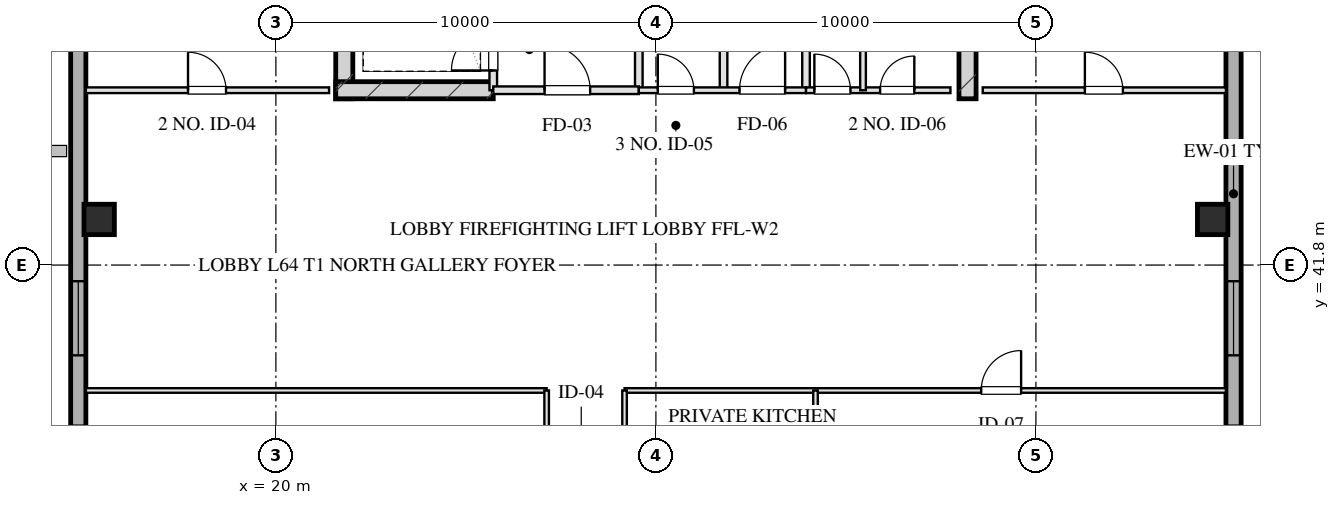
"""IFC4 building model, lengths in metres.
Left out: names, types, materials, properties, quantities, classifications, styles, units other than length and angle.
Written with IfcOpenShell. Run it as: python <this file> out.ifc"""

import sys

from ifc_helpers import new_model, si_unit, direction, frame, frame_2d, origin, origin_2d, place, context, subcontext, project, spatial, rectangle, hollow_rectangle, extrude, element, fill, save


model = new_model("IFC4")
c1 = context("Model", 3, precision=1e-05, world=origin(), true_north=direction((0.0, 1.0)))
c2 = subcontext(c1, "Body", "Model", "MODEL_VIEW")
j1 = project(units=[si_unit("LENGTHUNIT", "METRE"), si_unit("PLANEANGLEUNIT", "RADIAN")], contexts=[c1])
p1 = place(None, origin())
s1 = spatial("IfcSite", under=j1, at=p1, CompositionType="ELEMENT")
p2 = place(p1, origin())
s2 = spatial("IfcBuilding", under=s1, at=p2, CompositionType="ELEMENT")
p3 = place(p2, frame((0.0, 0.0, 237.6)))
s3 = spatial("IfcBuildingStorey", under=s2, at=p3, CompositionType="ELEMENT", Elevation=237.6)
for number, where, z_axis, x_axis in (
    (1, (21.8, 46.175, 0.0), (0.0, 0.0, 1.0), (0.0, 1.0, 0.0)),
    (2, (38.2, 46.175, 0.0), (0.0, 0.0, 1.0), (0.0, 1.0, 0.0)),
):
    element("IfcWall", number, at=place(p3, frame(where, z_axis=z_axis, x_axis=x_axis)), inside=s3, PredefinedType="SHEAR", context=c2, shape_type="SweptSolid", body=[
        extrude(rectangle(XDim=9.33, YDim=0.45, at=frame_2d((4.665, 0.0))), origin(), (0.0, 0.0, 1.0), 3.2),
    ])
p4 = place(p3, frame((21.575, 46.4, 0.0), z_axis=(0.0, 0.0, 1.0), x_axis=(1.0, 0.0, 0.0)))
e3 = element("IfcWall", 3, at=p4, inside=s3, PredefinedType="SHEAR", context=c2, shape_type="SweptSolid", body=[
    extrude(rectangle(XDim=4.145, YDim=0.45, at=frame_2d((2.073, 0.0))), origin(), (0.0, 0.0, 1.0), 3.2),
])
for number, where, z_axis, x_axis in (
    (4, (15.35, 43.0, 0.0), (0.0, 0.0, 1.0), (1.0, 0.0, 0.0)),
    (5, (44.65, 43.0, 0.0), (0.0, 0.0, 1.0), (1.0, 0.0, 0.0)),
):
    element("IfcColumn", number, at=place(p3, frame(where, z_axis=z_axis, x_axis=x_axis)), inside=s3, PredefinedType="COLUMN", context=c2, shape_type="SweptSolid", body=[
        extrude(hollow_rectangle(XDim=0.8, YDim=0.8, WallThickness=0.028, at=origin_2d()), origin(), (0.0, 0.0, 1.0), 3.201),
    ])
p5 = place(p3, frame((14.8, 13.1, 0.0), z_axis=(0.0, 0.0, 1.0), x_axis=(0.0, 1.0, 0.0)))
e6 = element("IfcWall", 6, at=p5, inside=s3, PredefinedType="SOLIDWALL", context=c2, shape_type="SweptSolid", body=[
    extrude(rectangle(XDim=41.8, YDim=0.4, at=frame_2d((20.9, 0.0))), origin(), (0.0, 0.0, 1.0), 2.36),
])
p6 = place(p5, frame((22.525, 0.0, 0.75)))
e7 = element("IfcOpeningElement", 7, at=p6, cuts=e6, PredefinedType="OPENING", context=c2, shape_type="SweptSolid", body=[
    extrude(rectangle(XDim=1.95, YDim=1.21, at=frame_2d((0.975, 0.605))), frame((0.0, 0.21, 0.0), z_axis=(0.0, -1.0, 0.0), x_axis=(1.0, 0.0, 0.0)), (0.0, 0.0, 1.0), 0.42),
])
p7 = place(p5, frame((26.325, 0.0, 0.75)))
e8 = element("IfcOpeningElement", 8, at=p7, cuts=e6, PredefinedType="OPENING", context=c2, shape_type="SweptSolid", body=[
    extrude(rectangle(XDim=1.95, YDim=1.21, at=frame_2d((0.975, 0.605))), frame((0.0, 0.21, 0.0), z_axis=(0.0, -1.0, 0.0), x_axis=(1.0, 0.0, 0.0)), (0.0, 0.0, 1.0), 0.42),
])
p8 = place(p5, frame((17.5, 0.0, 0.0)))
e9 = element("IfcOpeningElement", 9, at=p8, cuts=e6, PredefinedType="OPENING", context=c2, shape_type="SweptSolid", body=[
    extrude(rectangle(XDim=1.1, YDim=2.15, at=frame_2d((0.55, 1.075))), frame((0.0, 0.21, 0.0), z_axis=(0.0, -1.0, 0.0), x_axis=(1.0, 0.0, 0.0)), (0.0, 0.0, 1.0), 0.42),
])
p9 = place(p3, frame((45.2, 54.9, 0.0), z_axis=(0.0, 0.0, 1.0), x_axis=(0.0, -1.0, 0.0)))
e10 = element("IfcWall", 10, at=p9, inside=s3, PredefinedType="SOLIDWALL", context=c2, shape_type="SweptSolid", body=[
    extrude(rectangle(XDim=41.8, YDim=0.4, at=frame_2d((20.9, 0.0))), origin(), (0.0, 0.0, 1.0), 2.36),
])
p10 = place(p9, frame((17.325, 0.0, 0.75)))
e11 = element("IfcOpeningElement", 11, at=p10, cuts=e10, PredefinedType="OPENING", context=c2, shape_type="SweptSolid", body=[
    extrude(rectangle(XDim=1.95, YDim=1.21, at=frame_2d((0.975, 0.605))), frame((0.0, 0.21, 0.0), z_axis=(0.0, -1.0, 0.0), x_axis=(1.0, 0.0, 0.0)), (0.0, 0.0, 1.0), 0.42),
])
p11 = place(p9, frame((13.525, 0.0, 0.75)))
e12 = element("IfcOpeningElement", 12, at=p11, cuts=e10, PredefinedType="OPENING", context=c2, shape_type="SweptSolid", body=[
    extrude(rectangle(XDim=1.95, YDim=1.21, at=frame_2d((0.975, 0.605))), frame((0.0, 0.21, 0.0), z_axis=(0.0, -1.0, 0.0), x_axis=(1.0, 0.0, 0.0)), (0.0, 0.0, 1.0), 0.42),
])
p12 = place(p9, frame((23.2, 0.0, 0.0)))
e13 = element("IfcOpeningElement", 13, at=p12, cuts=e10, PredefinedType="OPENING", context=c2, shape_type="SweptSolid", body=[
    extrude(rectangle(XDim=1.1, YDim=2.15, at=frame_2d((0.55, 1.075))), frame((0.0, 0.21, 0.0), z_axis=(0.0, -1.0, 0.0), x_axis=(1.0, 0.0, 0.0)), (0.0, 0.0, 1.0), 0.42),
])
p13 = place(p3, frame((25.72, 46.4, 0.0), z_axis=(0.0, 0.0, 1.0), x_axis=(0.0, 1.0, 0.0)))
e14 = element("IfcWall", 14, at=p13, inside=s3, PredefinedType="PARTITIONING", context=c2, shape_type="SweptSolid", body=[
    extrude(rectangle(XDim=1.9, YDim=0.2, at=frame_2d((0.95, 0.0))), origin(), (0.0, 0.0, 1.0), 2.925),
])
p14 = place(p13, frame((0.52, 0.0, 0.0)))
e15 = element("IfcOpeningElement", 15, at=p14, cuts=e14, PredefinedType="OPENING", context=c2, shape_type="SweptSolid", body=[
    extrude(rectangle(XDim=1.1, YDim=2.05, at=frame_2d((0.55, 1.025))), frame((0.0, 0.11, 0.0), z_axis=(0.0, -1.0, 0.0), x_axis=(1.0, 0.0, 0.0)), (0.0, 0.0, 1.0), 0.22),
])
p15 = place(p3, frame((29.55, 46.4, 0.0), z_axis=(0.0, 0.0, 1.0), x_axis=(0.0, 1.0, 0.0)))
e16 = element("IfcWall", 16, at=p15, inside=s3, PredefinedType="PARTITIONING", context=c2, shape_type="SweptSolid", body=[
    extrude(rectangle(XDim=8.43, YDim=0.2, at=frame_2d((4.215, 0.0))), origin(), (0.0, 0.0, 1.0), 2.925),
])
p16 = place(p3, frame((25.72, 46.4, 0.0), z_axis=(0.0, 0.0, 1.0), x_axis=(1.0, 0.0, 0.0)))
e17 = element("IfcWall", 17, at=p16, inside=s3, PredefinedType="PARTITIONING", context=c2, shape_type="SweptSolid", body=[
    extrude(rectangle(XDim=3.83, YDim=0.2, at=frame_2d((1.915, 0.0))), origin(), (0.0, 0.0, 1.0), 2.925),
])
p17 = place(p16, frame((1.35, 0.0, 0.0)))
e18 = element("IfcOpeningElement", 18, at=p17, cuts=e17, PredefinedType="OPENING", context=c2, shape_type="SweptSolid", body=[
    extrude(rectangle(XDim=1.2, YDim=2.05, at=frame_2d((0.6, 1.025))), frame((0.0, 0.11, 0.0), z_axis=(0.0, -1.0, 0.0), x_axis=(1.0, 0.0, 0.0)), (0.0, 0.0, 1.0), 0.22),
])
for number, where, z_axis, x_axis in (
    (19, (33.95, 46.4, 0.0), (0.0, 0.0, 1.0), (0.0, 1.0, 0.0)),
    (20, (31.78, 46.4, 0.0), (0.0, 0.0, 1.0), (0.0, 1.0, 0.0)),
):
    element("IfcWall", number, at=place(p3, frame(where, z_axis=z_axis, x_axis=x_axis)), inside=s3, PredefinedType="PARTITIONING", context=c2, shape_type="SweptSolid", body=[
        extrude(rectangle(XDim=8.43, YDim=0.2, at=frame_2d((4.215, 0.0))), origin(), (0.0, 0.0, 1.0), 2.925),
    ])
p18 = place(p3, frame((29.55, 46.4, 0.0), z_axis=(0.0, 0.0, 1.0), x_axis=(1.0, 0.0, 0.0)))
e21 = element("IfcWall", 21, at=p18, inside=s3, PredefinedType="PARTITIONING", context=c2, shape_type="SweptSolid", body=[
    extrude(rectangle(XDim=4.4, YDim=0.15, at=frame_2d((2.2, 0.0))), origin(), (0.0, 0.0, 1.0), 2.925),
])
p19 = place(p18, frame((0.5, 0.0, 0.0)))
e22 = element("IfcOpeningElement", 22, at=p19, cuts=e21, PredefinedType="OPENING", context=c2, shape_type="SweptSolid", body=[
    extrude(rectangle(XDim=0.95, YDim=2.05, at=frame_2d((0.475, 1.025))), frame((0.0, 0.085, 0.0), z_axis=(0.0, -1.0, 0.0), x_axis=(1.0, 0.0, 0.0)), (0.0, 0.0, 1.0), 0.17),
])
p20 = place(p18, frame((2.65, 0.0, 0.0)))
e23 = element("IfcOpeningElement", 23, at=p20, cuts=e21, PredefinedType="OPENING", context=c2, shape_type="SweptSolid", body=[
    extrude(rectangle(XDim=1.2, YDim=2.05, at=frame_2d((0.6, 1.025))), frame((0.0, 0.085, 0.0), z_axis=(0.0, -1.0, 0.0), x_axis=(1.0, 0.0, 0.0)), (0.0, 0.0, 1.0), 0.17),
])
p21 = place(p3, frame((33.95, 46.4, 0.0), z_axis=(0.0, 0.0, 1.0), x_axis=(1.0, 0.0, 0.0)))
e24 = element("IfcWall", 24, at=p21, inside=s3, PredefinedType="PARTITIONING", context=c2, shape_type="SweptSolid", body=[
    extrude(rectangle(XDim=3.8, YDim=0.15, at=frame_2d((1.9, 0.0))), origin(), (0.0, 0.0, 1.0), 2.925),
])
p22 = place(p21, frame((0.22, 0.0, 0.0)))
e25 = element("IfcOpeningElement", 25, at=p22, cuts=e24, PredefinedType="OPENING", context=c2, shape_type="SweptSolid", body=[
    extrude(rectangle(XDim=0.95, YDim=2.05, at=frame_2d((0.475, 1.025))), frame((0.0, 0.085, 0.0), z_axis=(0.0, -1.0, 0.0), x_axis=(1.0, 0.0, 0.0)), (0.0, 0.0, 1.0), 0.17),
])
p23 = place(p21, frame((1.95, 0.0, 0.0)))
e26 = element("IfcOpeningElement", 26, at=p23, cuts=e24, PredefinedType="OPENING", context=c2, shape_type="SweptSolid", body=[
    extrude(rectangle(XDim=0.9, YDim=2.05, at=frame_2d((0.45, 1.025))), frame((0.0, 0.085, 0.0), z_axis=(0.0, -1.0, 0.0), x_axis=(1.0, 0.0, 0.0)), (0.0, 0.0, 1.0), 0.17),
])
p24 = place(p3, frame((35.45, 46.4, 0.0), z_axis=(0.0, 0.0, 1.0), x_axis=(0.0, 1.0, 0.0)))
e27 = element("IfcWall", 27, at=p24, inside=s3, PredefinedType="PARTITIONING", context=c2, shape_type="SweptSolid", body=[
    extrude(rectangle(XDim=8.43, YDim=0.15, at=frame_2d((4.215, 0.0))), origin(), (0.0, 0.0, 1.0), 2.515),
])
p25 = place(p24, frame((2.55, 0.0, 0.0)))
e28 = element("IfcOpeningElement", 28, at=p25, cuts=e27, PredefinedType="OPENING", context=c2, shape_type="SweptSolid", body=[
    extrude(rectangle(XDim=0.95, YDim=2.05, at=frame_2d((0.475, 1.025))), frame((0.0, 0.085, 0.0), z_axis=(0.0, -1.0, 0.0), x_axis=(1.0, 0.0, 0.0)), (0.0, 0.0, 1.0), 0.17),
])
p26 = place(p24, frame((5.6, 0.0, 0.0)))
e29 = element("IfcOpeningElement", 29, at=p26, cuts=e27, PredefinedType="OPENING", context=c2, shape_type="SweptSolid", body=[
    extrude(rectangle(XDim=0.9, YDim=2.05, at=frame_2d((0.45, 1.025))), frame((0.0, 0.085, 0.0), z_axis=(0.0, -1.0, 0.0), x_axis=(1.0, 0.0, 0.0)), (0.0, 0.0, 1.0), 0.17),
])
p27 = place(p3, frame((15.0, 46.4, 0.0), z_axis=(0.0, 0.0, 1.0), x_axis=(1.0, 0.0, 0.0)))
e30 = element("IfcWall", 30, at=p27, inside=s3, PredefinedType="PARTITIONING", context=c2, shape_type="SweptSolid", body=[
    extrude(rectangle(XDim=6.4, YDim=0.15, at=frame_2d((3.2, 0.0))), origin(), (0.0, 0.0, 1.0), 2.925),
])
p28 = place(p27, frame((2.688, 0.0, 0.0)))
e31 = element("IfcOpeningElement", 31, at=p28, cuts=e30, PredefinedType="OPENING", context=c2, shape_type="SweptSolid", body=[
    extrude(rectangle(XDim=1.0, YDim=2.05, at=frame_2d((0.5, 1.025))), frame((0.0, 0.085, 0.0), z_axis=(0.0, -1.0, 0.0), x_axis=(1.0, 0.0, 0.0)), (0.0, 0.0, 1.0), 0.17),
])
p29 = place(p3, frame((38.6, 46.4, 0.0), z_axis=(0.0, 0.0, 1.0), x_axis=(1.0, 0.0, 0.0)))
e32 = element("IfcWall", 32, at=p29, inside=s3, PredefinedType="PARTITIONING", context=c2, shape_type="SweptSolid", body=[
    extrude(rectangle(XDim=6.4, YDim=0.15, at=frame_2d((3.2, 0.0))), origin(), (0.0, 0.0, 1.0), 2.925),
])
p30 = place(p29, frame((2.688, 0.0, 0.0)))
e33 = element("IfcOpeningElement", 33, at=p30, cuts=e32, PredefinedType="OPENING", context=c2, shape_type="SweptSolid", body=[
    extrude(rectangle(XDim=1.0, YDim=2.05, at=frame_2d((0.5, 1.025))), frame((0.0, 0.085, 0.0), z_axis=(0.0, -1.0, 0.0), x_axis=(1.0, 0.0, 0.0)), (0.0, 0.0, 1.0), 0.17),
])
p31 = place(p3, frame((15.0, 38.5, 0.0), z_axis=(0.0, 0.0, 1.0), x_axis=(1.0, 0.0, 0.0)))
e34 = element("IfcWall", 34, at=p31, inside=s3, PredefinedType="PARTITIONING", context=c2, shape_type="SweptSolid", body=[
    extrude(rectangle(XDim=12.125, YDim=0.12, at=frame_2d((6.062, 0.0))), origin(), (0.0, 0.0, 1.0), 2.925),
])
p32 = place(p3, frame((29.175, 38.5, 0.0), z_axis=(0.0, 0.0, 1.0), x_axis=(1.0, 0.0, 0.0)))
e35 = element("IfcWall", 35, at=p32, inside=s3, PredefinedType="PARTITIONING", context=c2, shape_type="SweptSolid", body=[
    extrude(rectangle(XDim=15.825, YDim=0.12, at=frame_2d((7.913, 0.0))), origin(), (0.0, 0.0, 1.0), 2.925),
])
p33 = place(p32, frame((9.385, 0.0, 0.0)))
e36 = element("IfcOpeningElement", 36, at=p33, cuts=e35, PredefinedType="OPENING", context=c2, shape_type="SweptSolid", body=[
    extrude(rectangle(XDim=1.05, YDim=2.05, at=frame_2d((0.525, 1.025))), frame((0.0, 0.07, 0.0), z_axis=(0.0, -1.0, 0.0), x_axis=(1.0, 0.0, 0.0)), (0.0, 0.0, 1.0), 0.14),
])
p34 = place(p3, frame((27.125, 29.5, 0.0), z_axis=(0.0, 0.0, 1.0), x_axis=(0.0, 1.0, 0.0)))
e37 = element("IfcWall", 37, at=p34, inside=s3, PredefinedType="PARTITIONING", context=c2, shape_type="SweptSolid", body=[
    extrude(rectangle(XDim=9.0, YDim=0.12, at=frame_2d((4.5, 0.0))), origin(), (0.0, 0.0, 1.0), 2.925),
])
p35 = place(p34, frame((2.335, 0.0, 0.0)))
e38 = element("IfcOpeningElement", 38, at=p35, cuts=e37, PredefinedType="OPENING", context=c2, shape_type="SweptSolid", body=[
    extrude(rectangle(XDim=1.0, YDim=2.05, at=frame_2d((0.5, 1.025))), frame((0.0, 0.07, 0.0), z_axis=(0.0, -1.0, 0.0), x_axis=(1.0, 0.0, 0.0)), (0.0, 0.0, 1.0), 0.14),
])
p36 = place(p34, frame((6.835, 0.0, 0.0)))
e39 = element("IfcOpeningElement", 39, at=p36, cuts=e37, PredefinedType="OPENING", context=c2, shape_type="SweptSolid", body=[
    extrude(rectangle(XDim=1.0, YDim=2.05, at=frame_2d((0.5, 1.025))), frame((0.0, 0.07, 0.0), z_axis=(0.0, -1.0, 0.0), x_axis=(1.0, 0.0, 0.0)), (0.0, 0.0, 1.0), 0.14),
])
p37 = place(p3, frame((29.175, 29.5, 0.0), z_axis=(0.0, 0.0, 1.0), x_axis=(0.0, 1.0, 0.0)))
e40 = element("IfcWall", 40, at=p37, inside=s3, PredefinedType="PARTITIONING", context=c2, shape_type="SweptSolid", body=[
    extrude(rectangle(XDim=9.0, YDim=0.12, at=frame_2d((4.5, 0.0))), origin(), (0.0, 0.0, 1.0), 2.925),
])
p38 = place(p37, frame((1.165, 0.0, 0.0)))
e41 = element("IfcOpeningElement", 41, at=p38, cuts=e40, PredefinedType="OPENING", context=c2, shape_type="SweptSolid", body=[
    extrude(rectangle(XDim=1.0, YDim=2.05, at=frame_2d((0.5, 1.025))), frame((0.0, 0.07, 0.0), z_axis=(0.0, -1.0, 0.0), x_axis=(1.0, 0.0, 0.0)), (0.0, 0.0, 1.0), 0.14),
])
p39 = place(p37, frame((4.0, 0.0, 0.0)))
e42 = element("IfcOpeningElement", 42, at=p39, cuts=e40, PredefinedType="OPENING", context=c2, shape_type="SweptSolid", body=[
    extrude(rectangle(XDim=1.0, YDim=2.05, at=frame_2d((0.5, 1.025))), frame((0.0, 0.07, 0.0), z_axis=(0.0, -1.0, 0.0), x_axis=(1.0, 0.0, 0.0)), (0.0, 0.0, 1.0), 0.14),
])
p40 = place(p37, frame((6.835, 0.0, 0.0)))
e43 = element("IfcOpeningElement", 43, at=p40, cuts=e40, PredefinedType="OPENING", context=c2, shape_type="SweptSolid", body=[
    extrude(rectangle(XDim=1.0, YDim=2.05, at=frame_2d((0.5, 1.025))), frame((0.0, 0.07, 0.0), z_axis=(0.0, -1.0, 0.0), x_axis=(1.0, 0.0, 0.0)), (0.0, 0.0, 1.0), 0.14),
])
p41 = place(p3, frame((34.2, 35.17, 0.0), z_axis=(0.0, 0.0, 1.0), x_axis=(0.0, 1.0, 0.0)))
e44 = element("IfcWall", 44, at=p41, inside=s3, PredefinedType="PARTITIONING", context=c2, shape_type="SweptSolid", body=[
    extrude(rectangle(XDim=3.33, YDim=0.12, at=frame_2d((1.665, 0.0))), origin(), (0.0, 0.0, 1.0), 2.925),
])
p42 = place(p7, origin())
e45 = element("IfcWindow", 45, at=p42, inside=s3, PartitioningType="TRIPLE_PANEL_VERTICAL", PredefinedType="WINDOW", context=c2, shape_type="SweptSolid", body=[
    extrude(rectangle(XDim=1.95, YDim=1.21, at=frame_2d((0.975, 0.605))), frame((0.0, 0.03, 0.0), z_axis=(0.0, -1.0, 0.0), x_axis=(1.0, 0.0, 0.0)), (0.0, 0.0, 1.0), 0.06),
])
fill(e8, e45)
p43 = place(p11, origin())
e46 = element("IfcWindow", 46, at=p43, inside=s3, PartitioningType="TRIPLE_PANEL_VERTICAL", PredefinedType="WINDOW", context=c2, shape_type="SweptSolid", body=[
    extrude(rectangle(XDim=1.95, YDim=1.21, at=frame_2d((0.975, 0.605))), frame((0.0, 0.03, 0.0), z_axis=(0.0, -1.0, 0.0), x_axis=(1.0, 0.0, 0.0)), (0.0, 0.0, 1.0), 0.06),
])
fill(e12, e46)
p44 = place(p14, origin())
e47 = element("IfcDoor", 47, at=p44, inside=s3, OperationType="SINGLE_SWING_LEFT", PredefinedType="DOOR", context=c2, shape_type="SweptSolid", body=[
    extrude(rectangle(XDim=1.1, YDim=2.05, at=frame_2d((0.55, 1.025))), frame((0.0, 0.025, 0.0), z_axis=(0.0, -1.0, 0.0), x_axis=(1.0, 0.0, 0.0)), (0.0, 0.0, 1.0), 0.05),
])
fill(e15, e47)
p45 = place(p17, origin())
e48 = element("IfcDoor", 48, at=p45, inside=s3, OperationType="SINGLE_SWING_LEFT", PredefinedType="DOOR", context=c2, shape_type="SweptSolid", body=[
    extrude(rectangle(XDim=1.2, YDim=2.05, at=frame_2d((0.6, 1.025))), frame((0.0, 0.025, 0.0), z_axis=(0.0, -1.0, 0.0), x_axis=(1.0, 0.0, 0.0)), (0.0, 0.0, 1.0), 0.05),
])
fill(e18, e48)
p46 = place(p19, origin())
e49 = element("IfcDoor", 49, at=p46, inside=s3, OperationType="SINGLE_SWING_LEFT", PredefinedType="DOOR", context=c2, shape_type="SweptSolid", body=[
    extrude(rectangle(XDim=0.95, YDim=2.05, at=frame_2d((0.475, 1.025))), frame((0.0, 0.025, 0.0), z_axis=(0.0, -1.0, 0.0), x_axis=(1.0, 0.0, 0.0)), (0.0, 0.0, 1.0), 0.05),
])
fill(e22, e49)
p47 = place(p20, origin())
e50 = element("IfcDoor", 50, at=p47, inside=s3, OperationType="SINGLE_SWING_RIGHT", PredefinedType="DOOR", context=c2, shape_type="SweptSolid", body=[
    extrude(rectangle(XDim=1.2, YDim=2.05, at=frame_2d((0.6, 1.025))), frame((0.0, 0.025, 0.0), z_axis=(0.0, -1.0, 0.0), x_axis=(1.0, 0.0, 0.0)), (0.0, 0.0, 1.0), 0.05),
])
fill(e23, e50)
p48 = place(p22, origin())
e51 = element("IfcDoor", 51, at=p48, inside=s3, OperationType="SINGLE_SWING_LEFT", PredefinedType="DOOR", context=c2, shape_type="SweptSolid", body=[
    extrude(rectangle(XDim=0.95, YDim=2.05, at=frame_2d((0.475, 1.025))), frame((0.0, 0.025, 0.0), z_axis=(0.0, -1.0, 0.0), x_axis=(1.0, 0.0, 0.0)), (0.0, 0.0, 1.0), 0.05),
])
fill(e25, e51)
p49 = place(p23, origin())
e52 = element("IfcDoor", 52, at=p49, inside=s3, OperationType="SINGLE_SWING_RIGHT", PredefinedType="DOOR", context=c2, shape_type="SweptSolid", body=[
    extrude(rectangle(XDim=0.9, YDim=2.05, at=frame_2d((0.45, 1.025))), frame((0.0, 0.025, 0.0), z_axis=(0.0, -1.0, 0.0), x_axis=(1.0, 0.0, 0.0)), (0.0, 0.0, 1.0), 0.05),
])
fill(e26, e52)
p50 = place(p28, origin())
e53 = element("IfcDoor", 53, at=p50, inside=s3, OperationType="SINGLE_SWING_LEFT", PredefinedType="DOOR", context=c2, shape_type="SweptSolid", body=[
    extrude(rectangle(XDim=1.0, YDim=2.05, at=frame_2d((0.5, 1.025))), frame((0.0, 0.025, 0.0), z_axis=(0.0, -1.0, 0.0), x_axis=(1.0, 0.0, 0.0)), (0.0, 0.0, 1.0), 0.05),
])
fill(e31, e53)
p51 = place(p30, origin())
e54 = element("IfcDoor", 54, at=p51, inside=s3, OperationType="SINGLE_SWING_LEFT", PredefinedType="DOOR", context=c2, shape_type="SweptSolid", body=[
    extrude(rectangle(XDim=1.0, YDim=2.05, at=frame_2d((0.5, 1.025))), frame((0.0, 0.025, 0.0), z_axis=(0.0, -1.0, 0.0), x_axis=(1.0, 0.0, 0.0)), (0.0, 0.0, 1.0), 0.05),
])
fill(e33, e54)
p52 = place(p33, origin())
e55 = element("IfcDoor", 55, at=p52, inside=s3, OperationType="SINGLE_SWING_RIGHT", PredefinedType="DOOR", context=c2, shape_type="SweptSolid", body=[
    extrude(rectangle(XDim=1.05, YDim=2.05, at=frame_2d((0.525, 1.025))), frame((0.0, 0.025, 0.0), z_axis=(0.0, -1.0, 0.0), x_axis=(1.0, 0.0, 0.0)), (0.0, 0.0, 1.0), 0.05),
])
fill(e36, e55)
save(model, sys.argv[1])
